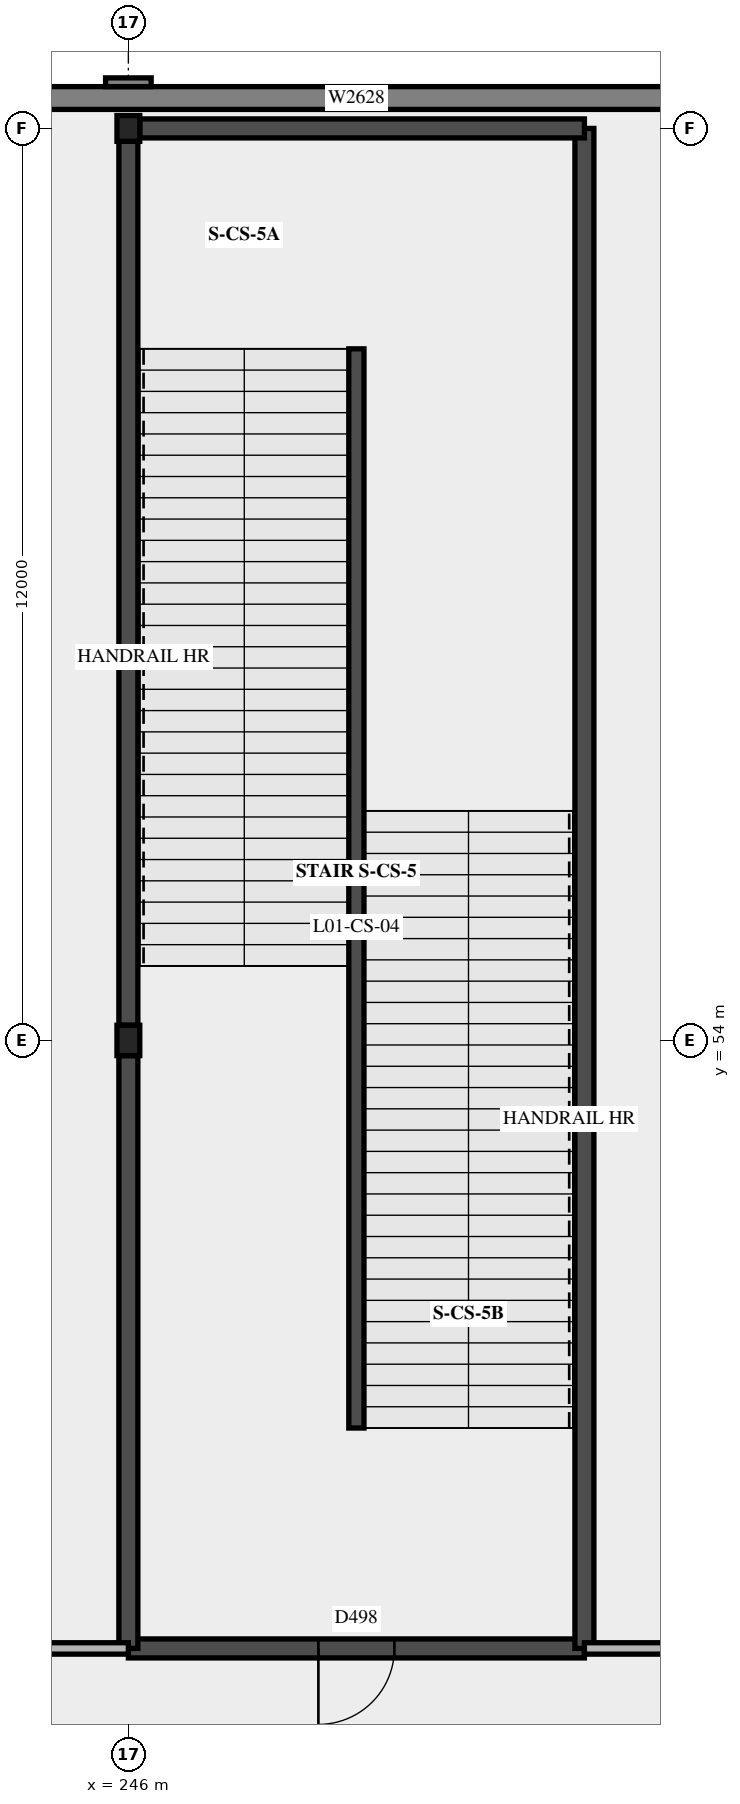
"""IFC4 building model, lengths in metres.
Left out: names, types, materials, properties, quantities, classifications, styles, units other than length and angle.
Written with IfcOpenShell. Run it as: python <this file> out.ifc"""

import sys

from ifc_helpers import new_model, si_unit, direction, frame, frame_2d, origin, origin_2d, place, context, subcontext, project, spatial, polyline, rectangle, i_section, outline, extrude, element, fill, save


model = new_model("IFC4")
c1 = context("Model", 3, precision=1e-05, world=origin(), true_north=direction((0.0, 1.0)))
c2 = subcontext(c1, "Body", "Model", "MODEL_VIEW")
j1 = project(units=[si_unit("LENGTHUNIT", "METRE"), si_unit("PLANEANGLEUNIT", "RADIAN")], contexts=[c1])
p1 = place(None, origin())
s1 = spatial("IfcSite", under=j1, at=p1, CompositionType="ELEMENT")
p2 = place(p1, origin())
s2 = spatial("IfcBuilding", under=s1, at=p2, CompositionType="ELEMENT")
p3 = place(p2, frame((0.0, 0.0, 5.4)))
s3 = spatial("IfcBuildingStorey", under=s2, at=p3, CompositionType="ELEMENT", Elevation=5.4)
p4 = place(p3, frame((246.0, 54.0, 0.0), z_axis=(0.0, 0.0, 1.0), x_axis=(1.0, 0.0, 0.0)))
e1 = element("IfcColumn", 1, at=p4, inside=s3, PredefinedType="COLUMN", context=c2, shape_type="SweptSolid", body=[
    extrude(i_section(OverallWidth=0.3, OverallDepth=0.4, WebThickness=0.013, FlangeThickness=0.024, at=origin_2d()), origin(), (0.0, 0.0, 1.0), 5.4),
])
p5 = place(p3, frame((246.0, 66.0, 0.0), z_axis=(0.0, 0.0, 1.0), x_axis=(1.0, 0.0, 0.0)))
e2 = element("IfcColumn", 2, at=p5, inside=s3, PredefinedType="COLUMN", context=c2, shape_type="SweptSolid", body=[
    extrude(i_section(OverallWidth=0.3, OverallDepth=0.34, WebThickness=0.012, FlangeThickness=0.021, at=origin_2d()), origin(), (0.0, 0.0, 1.0), 5.4),
])
p6 = place(p3, frame((246.0, 46.0, 0.0), z_axis=(0.0, 0.0, 1.0), x_axis=(1.0, 0.0, 0.0)))
e3 = element("IfcWall", 3, at=p6, inside=s3, PredefinedType="SHEAR", context=c2, shape_type="SweptSolid", body=[
    extrude(rectangle(XDim=6.0, YDim=0.25, at=frame_2d((3.0, 0.0))), origin(), (0.0, 0.0, 1.0), 5.4),
])
p7 = place(p6, frame((2.5, 0.0, 0.0)))
e4 = element("IfcOpeningElement", 4, at=p7, cuts=e3, PredefinedType="OPENING", context=c2, shape_type="SweptSolid", body=[
    extrude(rectangle(XDim=1.0, YDim=2.1, at=frame_2d((0.5, 1.05))), frame((0.0, 0.135, 0.0), z_axis=(0.0, -1.0, 0.0), x_axis=(1.0, 0.0, 0.0)), (0.0, 0.0, 1.0), 0.27),
])
p8 = place(p3, frame((252.0, 46.0, 0.0), z_axis=(0.0, 0.0, 1.0), x_axis=(0.0, 1.0, 0.0)))
e5 = element("IfcWall", 5, at=p8, inside=s3, PredefinedType="SHEAR", context=c2, shape_type="SweptSolid", body=[
    extrude(rectangle(XDim=20.0, YDim=0.25, at=frame_2d((10.0, 0.0))), origin(), (0.0, 0.0, 1.0), 5.4),
])
p9 = place(p3, frame((246.15, 66.0, 0.0), z_axis=(0.0, 0.0, 1.0), x_axis=(1.0, 0.0, 0.0)))
e6 = element("IfcWall", 6, at=p9, inside=s3, PredefinedType="SHEAR", context=c2, shape_type="SweptSolid", body=[
    extrude(rectangle(XDim=5.85, YDim=0.25, at=frame_2d((2.925, 0.0))), origin(), (0.0, 0.0, 1.0), 5.4),
])
p10 = place(p3, frame((246.0, 46.0, 0.0), z_axis=(0.0, 0.0, 1.0), x_axis=(0.0, 1.0, 0.0)))
e7 = element("IfcWall", 7, at=p10, inside=s3, PredefinedType="SHEAR", context=c2, shape_type="SweptSolid", body=[
    extrude(rectangle(XDim=7.8, YDim=0.25, at=frame_2d((3.9, 0.0))), origin(), (0.0, 0.0, 1.0), 5.4),
])
p11 = place(p3, frame((246.0, 54.2, 0.0), z_axis=(0.0, 0.0, 1.0), x_axis=(0.0, 1.0, 0.0)))
e8 = element("IfcWall", 8, at=p11, inside=s3, PredefinedType="SHEAR", context=c2, shape_type="SweptSolid", body=[
    extrude(rectangle(XDim=11.63, YDim=0.25, at=frame_2d((5.815, 0.0))), origin(), (0.0, 0.0, 1.0), 5.4),
])
p12 = place(p3, frame((282.25, 66.4, 0.0), z_axis=(0.0, 0.0, 1.0), x_axis=(-1.0, 0.0, 0.0)))
e9 = element("IfcWall", 9, at=p12, inside=s3, PredefinedType="SOLIDWALL", context=c2, shape_type="SweptSolid", body=[
    extrude(rectangle(XDim=84.5, YDim=0.3, at=frame_2d((42.25, 0.0))), origin(), (0.0, 0.0, 1.0), 5.4),
])
p13 = place(p12, frame((9.025, 0.0, 1.8)))
e10 = element("IfcOpeningElement", 10, at=p13, cuts=e9, PredefinedType="OPENING", context=c2, shape_type="SweptSolid", body=[
    extrude(rectangle(XDim=0.45, YDim=2.4, at=frame_2d((0.225, 1.2))), frame((0.0, 0.16, 0.0), z_axis=(0.0, -1.0, 0.0), x_axis=(1.0, 0.0, 0.0)), (0.0, 0.0, 1.0), 0.32),
])
p14 = place(p12, frame((21.025, 0.0, 1.8)))
e11 = element("IfcOpeningElement", 11, at=p14, cuts=e9, PredefinedType="OPENING", context=c2, shape_type="SweptSolid", body=[
    extrude(rectangle(XDim=0.45, YDim=2.4, at=frame_2d((0.225, 1.2))), frame((0.0, 0.16, 0.0), z_axis=(0.0, -1.0, 0.0), x_axis=(1.0, 0.0, 0.0)), (0.0, 0.0, 1.0), 0.32),
])
p15 = place(p12, frame((33.025, 0.0, 1.8)))
e12 = element("IfcOpeningElement", 12, at=p15, cuts=e9, PredefinedType="OPENING", context=c2, shape_type="SweptSolid", body=[
    extrude(rectangle(XDim=0.45, YDim=2.4, at=frame_2d((0.225, 1.2))), frame((0.0, 0.16, 0.0), z_axis=(0.0, -1.0, 0.0), x_axis=(1.0, 0.0, 0.0)), (0.0, 0.0, 1.0), 0.32),
])
p16 = place(p12, frame((45.025, 0.0, 1.8)))
e13 = element("IfcOpeningElement", 13, at=p16, cuts=e9, PredefinedType="OPENING", context=c2, shape_type="SweptSolid", body=[
    extrude(rectangle(XDim=0.45, YDim=2.4, at=frame_2d((0.225, 1.2))), frame((0.0, 0.16, 0.0), z_axis=(0.0, -1.0, 0.0), x_axis=(1.0, 0.0, 0.0)), (0.0, 0.0, 1.0), 0.32),
])
p17 = place(p12, frame((57.025, 0.0, 1.8)))
e14 = element("IfcOpeningElement", 14, at=p17, cuts=e9, PredefinedType="OPENING", context=c2, shape_type="SweptSolid", body=[
    extrude(rectangle(XDim=0.45, YDim=2.4, at=frame_2d((0.225, 1.2))), frame((0.0, 0.16, 0.0), z_axis=(0.0, -1.0, 0.0), x_axis=(1.0, 0.0, 0.0)), (0.0, 0.0, 1.0), 0.32),
])
p18 = place(p12, frame((69.025, 0.0, 1.8)))
e15 = element("IfcOpeningElement", 15, at=p18, cuts=e9, PredefinedType="OPENING", context=c2, shape_type="SweptSolid", body=[
    extrude(rectangle(XDim=0.45, YDim=2.4, at=frame_2d((0.225, 1.2))), frame((0.0, 0.16, 0.0), z_axis=(0.0, -1.0, 0.0), x_axis=(1.0, 0.0, 0.0)), (0.0, 0.0, 1.0), 0.32),
])
p19 = place(p12, frame((81.025, 0.0, 1.8)))
e16 = element("IfcOpeningElement", 16, at=p19, cuts=e9, PredefinedType="OPENING", context=c2, shape_type="SweptSolid", body=[
    extrude(rectangle(XDim=0.45, YDim=2.4, at=frame_2d((0.225, 1.2))), frame((0.0, 0.16, 0.0), z_axis=(0.0, -1.0, 0.0), x_axis=(1.0, 0.0, 0.0)), (0.0, 0.0, 1.0), 0.32),
])
p20 = place(p3, frame((246.3, 66.607, 0.0), z_axis=(0.0, 0.0, 1.0), x_axis=(-1.0, 0.0, 0.0)))
e17 = element("IfcWall", 17, at=p20, inside=s3, PredefinedType="SOLIDWALL", context=c2, shape_type="SweptSolid", body=[
    extrude(rectangle(XDim=0.6, YDim=0.115, at=frame_2d((0.3, 0.0))), origin(), (0.0, 0.0, 1.0), 5.4),
])
p21 = place(p3, frame((249.0, 48.9, 0.0), z_axis=(0.0, 0.0, 1.0), x_axis=(0.0, 1.0, 0.0)))
e18 = element("IfcWall", 18, at=p21, inside=s3, PredefinedType="SHEAR", context=c2, shape_type="SweptSolid", body=[
    extrude(rectangle(XDim=14.2, YDim=0.2, at=frame_2d((7.1, 0.0))), origin(), (0.0, 0.0, 1.0), 5.15),
])
p22 = place(p3, frame((228.0, 46.0, 0.0), z_axis=(0.0, 0.0, 1.0), x_axis=(1.0, 0.0, 0.0)))
e19 = element("IfcWall", 19, at=p22, inside=s3, PredefinedType="PARTITIONING", context=c2, shape_type="SweptSolid", body=[
    extrude(outline(polyline([(0.0, 0.0), (18.0, 0.0), (18.0, 5.15), (15.705, 5.15), (15.7, 4.63), (15.5, 4.63), (15.495, 5.15), (13.305, 5.15), (13.3, 4.63), (13.1, 4.63), (13.095, 5.15), (10.905, 5.15), (10.9, 4.63), (10.7, 4.63), (10.695, 5.15), (8.505, 5.15), (8.5, 4.63), (8.3, 4.63), (8.295, 5.15), (6.1, 5.15), (6.095, 4.68), (5.905, 4.68), (5.9, 5.15), (3.705, 5.15), (3.7, 4.63), (3.5, 4.63), (3.495, 5.15), (1.305, 5.15), (1.3, 4.63), (1.1, 4.63), (1.095, 5.15), (0.0, 5.15), (0.0, 0.0)])), frame((0.0, 0.075, 0.0), z_axis=(0.0, -1.0, 0.0), x_axis=(1.0, 0.0, 0.0)), (0.0, 0.0, 1.0), 0.15),
])
p23 = place(p22, frame((8.4, 0.0, 0.0)))
e20 = element("IfcOpeningElement", 20, at=p23, cuts=e19, PredefinedType="OPENING", context=c2, shape_type="SweptSolid", body=[
    extrude(rectangle(XDim=1.2, YDim=2.4, at=frame_2d((0.6, 1.2))), frame((0.0, 0.085, 0.0), z_axis=(0.0, -1.0, 0.0), x_axis=(1.0, 0.0, 0.0)), (0.0, 0.0, 1.0), 0.17),
])
p24 = place(p3, frame((252.0, 46.0, 0.0), z_axis=(0.0, 0.0, 1.0), x_axis=(1.0, 0.0, 0.0)))
e21 = element("IfcWall", 21, at=p24, inside=s3, PredefinedType="PARTITIONING", context=c2, shape_type="SweptSolid", body=[
    extrude(outline(polyline([(0.0, 0.0), (18.0, 0.0), (18.0, 5.15), (15.705, 5.15), (15.7, 4.63), (15.5, 4.63), (15.495, 5.15), (13.305, 5.15), (13.3, 4.63), (13.1, 4.63), (13.095, 5.15), (10.905, 5.15), (10.9, 4.63), (10.7, 4.63), (10.695, 5.15), (8.505, 5.15), (8.5, 4.63), (8.3, 4.63), (8.295, 5.15), (6.1, 5.15), (6.095, 4.68), (5.905, 4.68), (5.9, 5.15), (3.705, 5.15), (3.7, 4.63), (3.5, 4.63), (3.495, 5.15), (1.305, 5.15), (1.3, 4.63), (1.1, 4.63), (1.095, 5.15), (0.0, 5.15), (0.0, 0.0)])), frame((0.0, 0.075, 0.0), z_axis=(0.0, -1.0, 0.0), x_axis=(1.0, 0.0, 0.0)), (0.0, 0.0, 1.0), 0.15),
])
p25 = place(p24, frame((8.4, 0.0, 0.0)))
e22 = element("IfcOpeningElement", 22, at=p25, cuts=e21, PredefinedType="OPENING", context=c2, shape_type="SweptSolid", body=[
    extrude(rectangle(XDim=1.2, YDim=2.4, at=frame_2d((0.6, 1.2))), frame((0.0, 0.085, 0.0), z_axis=(0.0, -1.0, 0.0), x_axis=(1.0, 0.0, 0.0)), (0.0, 0.0, 1.0), 0.17),
])
p26 = place(p15, origin())
e23 = element("IfcWindow", 23, at=p26, inside=s3, PartitioningType="SINGLE_PANEL", PredefinedType="WINDOW", context=c2, shape_type="SweptSolid", body=[
    extrude(rectangle(XDim=0.45, YDim=2.4, at=frame_2d((0.225, 1.2))), frame((0.0, 0.03, 0.0), z_axis=(0.0, -1.0, 0.0), x_axis=(1.0, 0.0, 0.0)), (0.0, 0.0, 1.0), 0.06),
])
fill(e12, e23)
p27 = place(p7, origin())
e24 = element("IfcDoor", 24, at=p27, inside=s3, OperationType="SINGLE_SWING_RIGHT", PredefinedType="DOOR", context=c2, shape_type="SweptSolid", body=[
    extrude(rectangle(XDim=1.0, YDim=2.1, at=frame_2d((0.5, 1.05))), frame((0.0, 0.025, 0.0), z_axis=(0.0, -1.0, 0.0), x_axis=(1.0, 0.0, 0.0)), (0.0, 0.0, 1.0), 0.05),
])
fill(e4, e24)
save(model, sys.argv[1])
